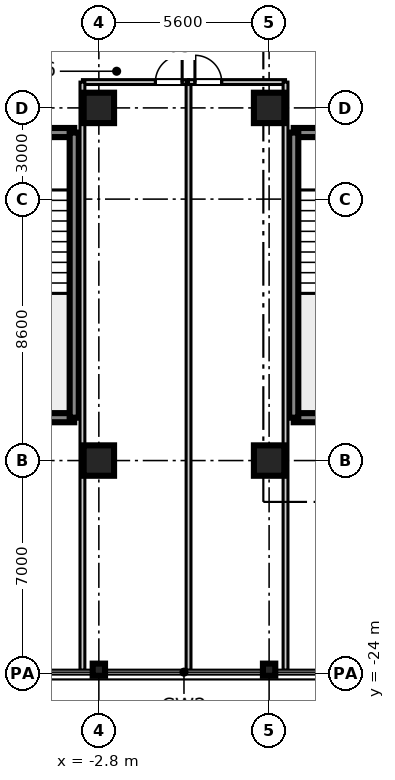
"""IFC4 building model, lengths in metres.
Left out: names, types, materials, properties, quantities, classifications, styles, units other than length and angle.
Written with IfcOpenShell. Run it as: python <this file> out.ifc"""

import sys

from ifc_helpers import new_model, si_unit, direction, frame, frame_2d, origin, origin_2d, place, context, subcontext, project, spatial, rectangle, i_section, extrude, source, transform, mapped, element, fill, save


model = new_model("IFC4")
c1 = context("Model", 3, precision=1e-05, world=origin(), true_north=direction((0.0, 1.0)))
c2 = subcontext(c1, "Body", "Model", "MODEL_VIEW")
j1 = project(units=[si_unit("LENGTHUNIT", "METRE"), si_unit("PLANEANGLEUNIT", "RADIAN")], contexts=[c1])
p1 = place(None, origin())
s1 = spatial("IfcSite", under=j1, at=p1, CompositionType="ELEMENT")
p2 = place(p1, origin())
s2 = spatial("IfcBuilding", under=s1, at=p2, CompositionType="ELEMENT")
p3 = place(p2, frame((0.0, 0.0, 227.1)))
s3 = spatial("IfcBuildingStorey", under=s2, at=p3, CompositionType="ELEMENT", Elevation=227.1)
m1 = source(origin(), c2, "Body", "SweptSolid", [
    extrude(rectangle(XDim=1.0, YDim=1.0, at=origin_2d()), origin(), (0.0, 0.0, 1.0), 3.655),
])
for number, where, z_axis, x_axis in (
    (1, (-2.8, -17.0, 0.0), (0.0, 0.0, 1.0), (1.0, 0.0, 0.0)),
    (2, (-2.8, -5.4, 0.0), (0.0, 0.0, 1.0), (1.0, 0.0, 0.0)),
    (3, (2.8, -17.0, 0.0), (0.0, 0.0, 1.0), (1.0, 0.0, 0.0)),
    (4, (2.8, -5.4, 0.0), (0.0, 0.0, 1.0), (1.0, 0.0, 0.0)),
):
    element("IfcColumn", number, at=place(p3, frame(where, z_axis=z_axis, x_axis=x_axis)), inside=s3, PredefinedType="COLUMN", context=c2, shape_type="MappedRepresentation", body=[
        mapped(m1, transform((0.0, 0.0, 0.0), scale=1.0)),
    ])
m2 = source(origin(), c2, "Body", "SweptSolid", [
    extrude(i_section(OverallWidth=0.401, OverallDepth=0.406, WebThickness=0.016, FlangeThickness=0.025, at=origin_2d()), origin(), (0.0, 0.0, 1.0), 3.655),
])
for number, where, z_axis, x_axis in (
    (5, (-2.8, -23.88, 0.0), (0.0, 0.0, 1.0), (0.0, 1.0, 0.0)),
    (6, (2.8, -23.88, 0.0), (0.0, 0.0, 1.0), (0.0, 1.0, 0.0)),
):
    element("IfcColumn", number, at=place(p3, frame(where, z_axis=z_axis, x_axis=x_axis)), inside=s3, PredefinedType="COLUMN", context=c2, shape_type="MappedRepresentation", body=[
        mapped(m2, transform((0.0, 0.0, 0.0), scale=1.0)),
    ])
m3 = source(origin(), c2, "Body", "SweptSolid", [
    extrude(rectangle(XDim=3.98, YDim=0.3, at=frame_2d((1.99, 0.0))), origin(), (0.0, 0.0, 1.0), 3.41),
])
for number, where, z_axis, x_axis in (
    (7, (3.61, -15.59, 0.0), (0.0, 0.0, 1.0), (1.0, 0.0, 0.0)),
    (8, (3.61, -6.21, 0.0), (0.0, 0.0, 1.0), (1.0, 0.0, 0.0)),
):
    element("IfcWall", number, at=place(p3, frame(where, z_axis=z_axis, x_axis=x_axis)), inside=s3, PredefinedType="SHEAR", context=c2, shape_type="MappedRepresentation", body=[
        mapped(m3, transform((0.0, 0.0, 0.0), scale=1.0)),
    ])
m4 = source(origin(), c2, "Body", "SweptSolid", [
    extrude(rectangle(XDim=9.38, YDim=0.3, at=frame_2d((4.69, 0.0))), origin(), (0.0, 0.0, 1.0), 3.41),
])
p4 = place(p3, frame((3.61, -15.59, 0.0), z_axis=(0.0, 0.0, 1.0), x_axis=(0.0, 1.0, 0.0)))
e9 = element("IfcWall", 9, at=p4, inside=s3, PredefinedType="SHEAR", context=c2, shape_type="MappedRepresentation", body=[
    mapped(m4, transform((0.0, 0.0, 0.0), scale=1.0)),
])
p5 = place(p3, frame((-7.59, -15.59, 0.0), z_axis=(0.0, 0.0, 1.0), x_axis=(1.0, 0.0, 0.0)))
e10 = element("IfcWall", 10, at=p5, inside=s3, PredefinedType="SHEAR", context=c2, shape_type="MappedRepresentation", body=[
    mapped(m3, transform((0.0, 0.0, 0.0), scale=1.0)),
])
p6 = place(p3, frame((-7.59, -6.21, 0.0), z_axis=(0.0, 0.0, 1.0), x_axis=(1.0, 0.0, 0.0)))
e11 = element("IfcWall", 11, at=p6, inside=s3, PredefinedType="SHEAR", context=c2, shape_type="MappedRepresentation", body=[
    mapped(m3, transform((0.0, 0.0, 0.0), scale=1.0)),
])
p7 = place(p6, frame((1.44, 0.0, 0.0)))
e12 = element("IfcOpeningElement", 12, at=p7, cuts=e11, PredefinedType="OPENING", context=c2, shape_type="SweptSolid", body=[
    extrude(rectangle(XDim=1.1, YDim=2.15, at=frame_2d((0.55, 1.075))), frame((0.0, 0.16, 0.0), z_axis=(0.0, -1.0, 0.0), x_axis=(1.0, 0.0, 0.0)), (0.0, 0.0, 1.0), 0.32),
])
p8 = place(p3, frame((-3.61, -15.59, 0.0), z_axis=(0.0, 0.0, 1.0), x_axis=(0.0, 1.0, 0.0)))
e13 = element("IfcWall", 13, at=p8, inside=s3, PredefinedType="SHEAR", context=c2, shape_type="MappedRepresentation", body=[
    mapped(m4, transform((0.0, 0.0, 0.0), scale=1.0)),
])
m5 = source(origin(), c2, "Body", "SweptSolid", [
    extrude(rectangle(XDim=3.49, YDim=0.16, at=frame_2d((1.745, 0.0))), origin(), (0.0, 0.0, 1.0), 2.75),
])
p9 = place(p3, frame((-3.34, -4.55, 0.0), z_axis=(0.0, 0.0, 1.0), x_axis=(1.0, 0.0, 0.0)))
e14 = element("IfcWall", 14, at=p9, inside=s3, PredefinedType="PARTITIONING", context=c2, shape_type="MappedRepresentation", body=[
    mapped(m5, transform((0.0, 0.0, 0.0), scale=1.0)),
])
p10 = place(p9, frame((2.4, 0.0, 0.0)))
e15 = element("IfcOpeningElement", 15, at=p10, cuts=e14, PredefinedType="OPENING", context=c2, shape_type="SweptSolid", body=[
    extrude(rectangle(XDim=0.88, YDim=2.1, at=frame_2d((0.44, 1.05))), frame((0.0, 0.09, 0.0), z_axis=(0.0, -1.0, 0.0), x_axis=(1.0, 0.0, 0.0)), (0.0, 0.0, 1.0), 0.18),
])
m6 = source(origin(), c2, "Body", "SweptSolid", [
    extrude(rectangle(XDim=19.35, YDim=0.16, at=frame_2d((9.675, 0.0))), origin(), (0.0, 0.0, 1.0), 2.75),
])
for number, where, z_axis, x_axis in (
    (16, (-3.34, -23.9, 0.0), (0.0, 0.0, 1.0), (0.0, 1.0, 0.0)),
    (17, (0.15, -23.9, 0.0), (0.0, 0.0, 1.0), (0.0, 1.0, 0.0)),
):
    element("IfcWall", number, at=place(p3, frame(where, z_axis=z_axis, x_axis=x_axis)), inside=s3, PredefinedType="PARTITIONING", context=c2, shape_type="MappedRepresentation", body=[
        mapped(m6, transform((0.0, 0.0, 0.0), scale=1.0)),
    ])
m7 = source(origin(), c2, "Body", "SweptSolid", [
    extrude(rectangle(XDim=3.19, YDim=0.16, at=frame_2d((1.595, 0.0))), origin(), (0.0, 0.0, 1.0), 2.75),
])
p11 = place(p3, frame((0.15, -4.55, 0.0), z_axis=(0.0, 0.0, 1.0), x_axis=(1.0, 0.0, 0.0)))
e18 = element("IfcWall", 18, at=p11, inside=s3, PredefinedType="PARTITIONING", context=c2, shape_type="MappedRepresentation", body=[
    mapped(m7, transform((0.0, 0.0, 0.0), scale=1.0)),
])
p12 = place(p11, frame((0.21, 0.0, 0.0)))
e19 = element("IfcOpeningElement", 19, at=p12, cuts=e18, PredefinedType="OPENING", context=c2, shape_type="SweptSolid", body=[
    extrude(rectangle(XDim=0.88, YDim=2.1, at=frame_2d((0.44, 1.05))), frame((0.0, 0.09, 0.0), z_axis=(0.0, -1.0, 0.0), x_axis=(1.0, 0.0, 0.0)), (0.0, 0.0, 1.0), 0.18),
])
p13 = place(p3, frame((3.34, -23.9, 0.0), z_axis=(0.0, 0.0, 1.0), x_axis=(0.0, 1.0, 0.0)))
e20 = element("IfcWall", 20, at=p13, inside=s3, PredefinedType="PARTITIONING", context=c2, shape_type="MappedRepresentation", body=[
    mapped(m6, transform((0.0, 0.0, 0.0), scale=1.0)),
])
m8 = source(origin(), c2, "Body", "SweptSolid", [
    extrude(rectangle(XDim=0.88, YDim=2.1, at=frame_2d((0.44, 1.05))), frame((0.0, 0.025, 0.0), z_axis=(0.0, -1.0, 0.0), x_axis=(1.0, 0.0, 0.0)), (0.0, 0.0, 1.0), 0.05),
])
p14 = place(p10, frame((0.88, 0.0, 0.0), z_axis=(0.0, 0.0, 1.0), x_axis=(-1.0, 0.0, 0.0)))
e21 = element("IfcDoor", 21, at=p14, inside=s3, OperationType="SINGLE_SWING_RIGHT", PredefinedType="DOOR", context=c2, shape_type="MappedRepresentation", body=[
    mapped(m8, transform((0.0, 0.0, 0.0), scale=1.0)),
])
fill(e15, e21)
p15 = place(p12, frame((0.88, 0.0, 0.0), z_axis=(0.0, 0.0, 1.0), x_axis=(-1.0, 0.0, 0.0)))
e22 = element("IfcDoor", 22, at=p15, inside=s3, OperationType="SINGLE_SWING_LEFT", PredefinedType="DOOR", context=c2, shape_type="MappedRepresentation", body=[
    mapped(m8, transform((0.0, 0.0, 0.0), scale=1.0)),
])
fill(e19, e22)
save(model, sys.argv[1])
